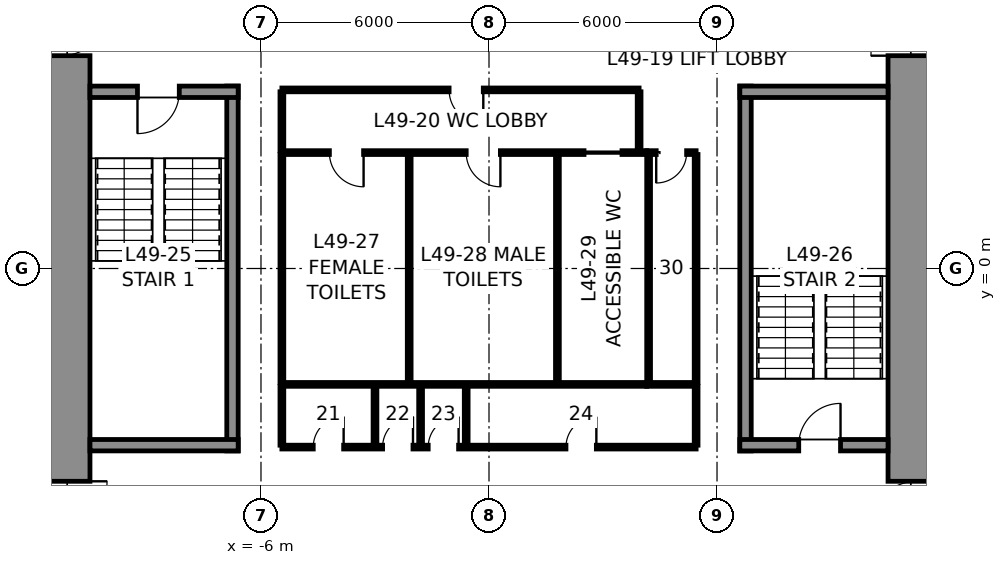
"""IFC4 building model, lengths in metres.
Left out: names, types, materials, properties, quantities, classifications, styles, units other than length and angle.
Written with IfcOpenShell. Run it as: python <this file> out.ifc"""

import sys

from ifc_helpers import new_model, si_unit, direction, frame, frame_2d, origin, place, context, subcontext, project, spatial, rectangle, extrude, element, fill, save


model = new_model("IFC4")
c1 = context("Model", 3, precision=1e-05, world=origin(), true_north=direction((0.0, 1.0)))
c2 = subcontext(c1, "Body", "Model", "MODEL_VIEW")
j1 = project(units=[si_unit("LENGTHUNIT", "METRE"), si_unit("PLANEANGLEUNIT", "RADIAN")], contexts=[c1])
p1 = place(None, origin())
s1 = spatial("IfcSite", under=j1, at=p1, CompositionType="ELEMENT")
p2 = place(p1, origin())
s2 = spatial("IfcBuilding", under=s1, at=p2, CompositionType="ELEMENT")
p3 = place(p2, frame((0.0, 0.0, 225.8)))
s3 = spatial("IfcBuildingStorey", under=s2, at=p3, CompositionType="ELEMENT", Elevation=225.8)
p4 = place(p3, frame((11.25, 10.5, 0.0), z_axis=(0.0, 0.0, 1.0), x_axis=(0.0, -1.0, 0.0)))
e1 = element("IfcWall", 1, at=p4, inside=s3, PredefinedType="SHEAR", context=c2, shape_type="SweptSolid", body=[
    extrude(rectangle(XDim=21.0, YDim=1.5, at=frame_2d((10.5, 0.0))), origin(), (0.0, 0.0, 1.0), 4.0),
])
p5 = place(p4, frame((3.7, 0.0, 0.0)))
e2 = element("IfcOpeningElement", 2, at=p5, cuts=e1, PredefinedType="OPENING", context=c2, shape_type="SweptSolid", body=[
    extrude(rectangle(XDim=1.2, YDim=2.3, at=frame_2d((0.6, 1.15))), frame((0.0, 0.76, 0.0), z_axis=(0.0, -1.0, 0.0), x_axis=(1.0, 0.0, 0.0)), (0.0, 0.0, 1.0), 1.52),
])
p6 = place(p4, frame((16.1, 0.0, 0.0)))
e3 = element("IfcOpeningElement", 3, at=p6, cuts=e1, PredefinedType="OPENING", context=c2, shape_type="SweptSolid", body=[
    extrude(rectangle(XDim=1.2, YDim=2.3, at=frame_2d((0.6, 1.15))), frame((0.0, 0.76, 0.0), z_axis=(0.0, -1.0, 0.0), x_axis=(1.0, 0.0, 0.0)), (0.0, 0.0, 1.0), 1.52),
])
p7 = place(p3, frame((-11.25, -10.5, 0.0), z_axis=(0.0, 0.0, 1.0), x_axis=(0.0, 1.0, 0.0)))
e4 = element("IfcWall", 4, at=p7, inside=s3, PredefinedType="SHEAR", context=c2, shape_type="SweptSolid", body=[
    extrude(rectangle(XDim=21.0, YDim=1.5, at=frame_2d((10.5, 0.0))), origin(), (0.0, 0.0, 1.0), 4.0),
])
p8 = place(p7, frame((16.1, 0.0, 0.0)))
e5 = element("IfcOpeningElement", 5, at=p8, cuts=e4, PredefinedType="OPENING", context=c2, shape_type="SweptSolid", body=[
    extrude(rectangle(XDim=1.2, YDim=2.3, at=frame_2d((0.6, 1.15))), frame((0.0, 0.76, 0.0), z_axis=(0.0, -1.0, 0.0), x_axis=(1.0, 0.0, 0.0)), (0.0, 0.0, 1.0), 1.52),
])
p9 = place(p7, frame((3.7, 0.0, 0.0)))
e6 = element("IfcOpeningElement", 6, at=p9, cuts=e4, PredefinedType="OPENING", context=c2, shape_type="SweptSolid", body=[
    extrude(rectangle(XDim=1.2, YDim=2.3, at=frame_2d((0.6, 1.15))), frame((0.0, 0.76, 0.0), z_axis=(0.0, -1.0, 0.0), x_axis=(1.0, 0.0, 0.0)), (0.0, 0.0, 1.0), 1.52),
])
p10 = place(p3, frame((-6.75, -4.8, 0.0), z_axis=(0.0, 0.0, 1.0), x_axis=(0.0, 1.0, 0.0)))
e7 = element("IfcWall", 7, at=p10, inside=s3, PredefinedType="SOLIDWALL", context=c2, shape_type="SweptSolid", body=[
    extrude(rectangle(XDim=9.6, YDim=0.3, at=frame_2d((4.8, 0.0))), origin(), (0.0, 0.0, 1.0), 3.75),
])
p11 = place(p3, frame((-10.5, 4.65, 0.0), z_axis=(0.0, 0.0, 1.0), x_axis=(1.0, 0.0, 0.0)))
e8 = element("IfcWall", 8, at=p11, inside=s3, PredefinedType="SOLIDWALL", context=c2, shape_type="SweptSolid", body=[
    extrude(rectangle(XDim=3.9, YDim=0.3, at=frame_2d((1.95, 0.0))), origin(), (0.0, 0.0, 1.0), 3.75),
])
p12 = place(p11, frame((1.25, 0.0, 0.0)))
e9 = element("IfcOpeningElement", 9, at=p12, cuts=e8, PredefinedType="OPENING", context=c2, shape_type="SweptSolid", body=[
    extrude(rectangle(XDim=1.1, YDim=2.3, at=frame_2d((0.55, 1.15))), frame((0.0, 0.16, 0.0), z_axis=(0.0, -1.0, 0.0), x_axis=(1.0, 0.0, 0.0)), (0.0, 0.0, 1.0), 0.32),
])
p13 = place(p3, frame((-6.6, -4.65, 0.0), z_axis=(0.0, 0.0, 1.0), x_axis=(-1.0, 0.0, 0.0)))
e10 = element("IfcWall", 10, at=p13, inside=s3, PredefinedType="SOLIDWALL", context=c2, shape_type="SweptSolid", body=[
    extrude(rectangle(XDim=3.9, YDim=0.3, at=frame_2d((1.95, 0.0))), origin(), (0.0, 0.0, 1.0), 3.75),
])
p14 = place(p3, frame((6.75, -4.8, 0.0), z_axis=(0.0, 0.0, 1.0), x_axis=(0.0, 1.0, 0.0)))
e11 = element("IfcWall", 11, at=p14, inside=s3, PredefinedType="SOLIDWALL", context=c2, shape_type="SweptSolid", body=[
    extrude(rectangle(XDim=9.6, YDim=0.3, at=frame_2d((4.8, 0.0))), origin(), (0.0, 0.0, 1.0), 3.75),
])
p15 = place(p3, frame((6.6, 4.65, 0.0), z_axis=(0.0, 0.0, 1.0), x_axis=(1.0, 0.0, 0.0)))
e12 = element("IfcWall", 12, at=p15, inside=s3, PredefinedType="SOLIDWALL", context=c2, shape_type="SweptSolid", body=[
    extrude(rectangle(XDim=3.9, YDim=0.3, at=frame_2d((1.95, 0.0))), origin(), (0.0, 0.0, 1.0), 3.75),
])
p16 = place(p3, frame((10.5, -4.65, 0.0), z_axis=(0.0, 0.0, 1.0), x_axis=(-1.0, 0.0, 0.0)))
e13 = element("IfcWall", 13, at=p16, inside=s3, PredefinedType="SOLIDWALL", context=c2, shape_type="SweptSolid", body=[
    extrude(rectangle(XDim=3.9, YDim=0.3, at=frame_2d((1.95, 0.0))), origin(), (0.0, 0.0, 1.0), 3.75),
])
p17 = place(p16, frame((1.25, 0.0, 0.0)))
e14 = element("IfcOpeningElement", 14, at=p17, cuts=e13, PredefinedType="OPENING", context=c2, shape_type="SweptSolid", body=[
    extrude(rectangle(XDim=1.1, YDim=2.3, at=frame_2d((0.55, 1.15))), frame((0.0, 0.16, 0.0), z_axis=(0.0, -1.0, 0.0), x_axis=(1.0, 0.0, 0.0)), (0.0, 0.0, 1.0), 0.32),
])
p18 = place(p3, frame((-5.45, 3.05, 0.0), z_axis=(0.0, 0.0, 1.0), x_axis=(1.0, 0.0, 0.0)))
e15 = element("IfcWall", 15, at=p18, inside=s3, PredefinedType="PARTITIONING", context=c2, shape_type="SweptSolid", body=[
    extrude(rectangle(XDim=9.6, YDim=0.1, at=frame_2d((4.8, 0.0))), origin(), (0.0, 0.0, 1.0), 3.75),
])
p19 = place(p18, frame((1.25, 0.0, 0.0)))
e16 = element("IfcOpeningElement", 16, at=p19, cuts=e15, PredefinedType="OPENING", context=c2, shape_type="SweptSolid", body=[
    extrude(rectangle(XDim=0.9, YDim=2.3, at=frame_2d((0.45, 1.15))), frame((0.0, 0.06, 0.0), z_axis=(0.0, -1.0, 0.0), x_axis=(1.0, 0.0, 0.0)), (0.0, 0.0, 1.0), 0.12),
])
p20 = place(p18, frame((4.85, 0.0, 0.0)))
e17 = element("IfcOpeningElement", 17, at=p20, cuts=e15, PredefinedType="OPENING", context=c2, shape_type="SweptSolid", body=[
    extrude(rectangle(XDim=0.9, YDim=2.3, at=frame_2d((0.45, 1.15))), frame((0.0, 0.06, 0.0), z_axis=(0.0, -1.0, 0.0), x_axis=(1.0, 0.0, 0.0)), (0.0, 0.0, 1.0), 0.12),
])
p21 = place(p18, frame((7.95, 0.0, 0.0)))
e18 = element("IfcOpeningElement", 18, at=p21, cuts=e15, PredefinedType="OPENING", context=c2, shape_type="SweptSolid", body=[
    extrude(rectangle(XDim=1.0, YDim=2.3, at=frame_2d((0.5, 1.15))), frame((0.0, 0.06, 0.0), z_axis=(0.0, -1.0, 0.0), x_axis=(1.0, 0.0, 0.0)), (0.0, 0.0, 1.0), 0.12),
])
p22 = place(p3, frame((4.15, 3.05, 0.0), z_axis=(0.0, 0.0, 1.0), x_axis=(1.0, 0.0, 0.0)))
e19 = element("IfcWall", 19, at=p22, inside=s3, PredefinedType="PARTITIONING", context=c2, shape_type="SweptSolid", body=[
    extrude(rectangle(XDim=1.3, YDim=0.1, at=frame_2d((0.65, 0.0))), origin(), (0.0, 0.0, 1.0), 3.75),
])
p23 = place(p22, frame((0.25, 0.0, 0.0)))
e20 = element("IfcOpeningElement", 20, at=p23, cuts=e19, PredefinedType="OPENING", context=c2, shape_type="SweptSolid", body=[
    extrude(rectangle(XDim=0.8, YDim=2.3, at=frame_2d((0.4, 1.15))), frame((0.0, 0.06, 0.0), z_axis=(0.0, -1.0, 0.0), x_axis=(1.0, 0.0, 0.0)), (0.0, 0.0, 1.0), 0.12),
])
p24 = place(p3, frame((4.15, -3.05, 0.0), z_axis=(0.0, 0.0, 1.0), x_axis=(-1.0, 0.0, 0.0)))
e21 = element("IfcWall", 21, at=p24, inside=s3, PredefinedType="PARTITIONING", context=c2, shape_type="SweptSolid", body=[
    extrude(rectangle(XDim=9.6, YDim=0.1, at=frame_2d((4.8, 0.0))), origin(), (0.0, 0.0, 1.0), 3.75),
])
p25 = place(p3, frame((5.45, -3.05, 0.0), z_axis=(0.0, 0.0, 1.0), x_axis=(-1.0, 0.0, 0.0)))
e22 = element("IfcWall", 22, at=p25, inside=s3, PredefinedType="PARTITIONING", context=c2, shape_type="SweptSolid", body=[
    extrude(rectangle(XDim=1.3, YDim=0.1, at=frame_2d((0.65, 0.0))), origin(), (0.0, 0.0, 1.0), 3.75),
])
for number, where, z_axis, x_axis in (
    (23, (5.45, 3.0, 0.0), (0.0, 0.0, 1.0), (0.0, -1.0, 0.0)),
    (24, (-5.45, -3.0, 0.0), (0.0, 0.0, 1.0), (0.0, 1.0, 0.0)),
    (25, (-2.1, -3.0, 0.0), (0.0, 0.0, 1.0), (0.0, 1.0, 0.0)),
    (26, (1.8, -3.0, 0.0), (0.0, 0.0, 1.0), (0.0, 1.0, 0.0)),
    (27, (4.2, -3.0, 0.0), (0.0, 0.0, 1.0), (0.0, 1.0, 0.0)),
):
    element("IfcWall", number, at=place(p3, frame(where, z_axis=z_axis, x_axis=x_axis)), inside=s3, PredefinedType="PARTITIONING", context=c2, shape_type="SweptSolid", body=[
        extrude(rectangle(XDim=6.0, YDim=0.1, at=frame_2d((3.0, 0.0))), origin(), (0.0, 0.0, 1.0), 3.75),
    ])
p26 = place(p3, frame((-5.45, 4.7, 0.0), z_axis=(0.0, 0.0, 1.0), x_axis=(1.0, 0.0, 0.0)))
e28 = element("IfcWall", 28, at=p26, inside=s3, PredefinedType="PARTITIONING", context=c2, shape_type="SweptSolid", body=[
    extrude(rectangle(XDim=9.4, YDim=0.1, at=frame_2d((4.7, 0.0))), origin(), (0.0, 0.0, 1.0), 3.75),
])
p27 = place(p26, frame((4.4, 0.0, 0.0)))
e29 = element("IfcOpeningElement", 29, at=p27, cuts=e28, PredefinedType="OPENING", context=c2, shape_type="SweptSolid", body=[
    extrude(rectangle(XDim=0.9, YDim=2.3, at=frame_2d((0.45, 1.15))), frame((0.0, 0.06, 0.0), z_axis=(0.0, -1.0, 0.0), x_axis=(1.0, 0.0, 0.0)), (0.0, 0.0, 1.0), 0.12),
])
for number, where, z_axis, x_axis in (
    (30, (-5.45, 3.1, 0.0), (0.0, 0.0, 1.0), (0.0, 1.0, 0.0)),
    (31, (3.95, 3.1, 0.0), (0.0, 0.0, 1.0), (0.0, 1.0, 0.0)),
):
    element("IfcWall", number, at=place(p3, frame(where, z_axis=z_axis, x_axis=x_axis)), inside=s3, PredefinedType="PARTITIONING", context=c2, shape_type="SweptSolid", body=[
        extrude(rectangle(XDim=1.55, YDim=0.1, at=frame_2d((0.775, 0.0))), origin(), (0.0, 0.0, 1.0), 3.75),
    ])
p28 = place(p3, frame((5.45, -4.7, 0.0), z_axis=(0.0, 0.0, 1.0), x_axis=(-1.0, 0.0, 0.0)))
e32 = element("IfcWall", 32, at=p28, inside=s3, PredefinedType="PARTITIONING", context=c2, shape_type="SweptSolid", body=[
    extrude(rectangle(XDim=10.9, YDim=0.1, at=frame_2d((5.45, 0.0))), origin(), (0.0, 0.0, 1.0), 3.75),
])
p29 = place(p28, frame((9.275, 0.0, 0.0)))
e33 = element("IfcOpeningElement", 33, at=p29, cuts=e32, PredefinedType="OPENING", context=c2, shape_type="SweptSolid", body=[
    extrude(rectangle(XDim=0.8, YDim=2.3, at=frame_2d((0.4, 1.15))), frame((0.0, 0.06, 0.0), z_axis=(0.0, -1.0, 0.0), x_axis=(1.0, 0.0, 0.0)), (0.0, 0.0, 1.0), 0.12),
])
p30 = place(p28, frame((7.45, 0.0, 0.0)))
e34 = element("IfcOpeningElement", 34, at=p30, cuts=e32, PredefinedType="OPENING", context=c2, shape_type="SweptSolid", body=[
    extrude(rectangle(XDim=0.8, YDim=2.3, at=frame_2d((0.4, 1.15))), frame((0.0, 0.06, 0.0), z_axis=(0.0, -1.0, 0.0), x_axis=(1.0, 0.0, 0.0)), (0.0, 0.0, 1.0), 0.12),
])
p31 = place(p28, frame((6.25, 0.0, 0.0)))
e35 = element("IfcOpeningElement", 35, at=p31, cuts=e32, PredefinedType="OPENING", context=c2, shape_type="SweptSolid", body=[
    extrude(rectangle(XDim=0.8, YDim=2.3, at=frame_2d((0.4, 1.15))), frame((0.0, 0.06, 0.0), z_axis=(0.0, -1.0, 0.0), x_axis=(1.0, 0.0, 0.0)), (0.0, 0.0, 1.0), 0.12),
])
p32 = place(p28, frame((2.625, 0.0, 0.0)))
e36 = element("IfcOpeningElement", 36, at=p32, cuts=e32, PredefinedType="OPENING", context=c2, shape_type="SweptSolid", body=[
    extrude(rectangle(XDim=0.8, YDim=2.3, at=frame_2d((0.4, 1.15))), frame((0.0, 0.06, 0.0), z_axis=(0.0, -1.0, 0.0), x_axis=(1.0, 0.0, 0.0)), (0.0, 0.0, 1.0), 0.12),
])
for number, where, z_axis, x_axis in (
    (37, (-5.45, -3.1, 0.0), (0.0, 0.0, 1.0), (0.0, -1.0, 0.0)),
    (38, (5.45, -3.1, 0.0), (0.0, 0.0, 1.0), (0.0, -1.0, 0.0)),
    (39, (-3.0, -3.1, 0.0), (0.0, 0.0, 1.0), (0.0, -1.0, 0.0)),
    (40, (-1.8, -3.1, 0.0), (0.0, 0.0, 1.0), (0.0, -1.0, 0.0)),
    (41, (-0.6, -3.1, 0.0), (0.0, 0.0, 1.0), (0.0, -1.0, 0.0)),
):
    element("IfcWall", number, at=place(p3, frame(where, z_axis=z_axis, x_axis=x_axis)), inside=s3, PredefinedType="PARTITIONING", context=c2, shape_type="SweptSolid", body=[
        extrude(rectangle(XDim=1.55, YDim=0.1, at=frame_2d((0.775, 0.0))), origin(), (0.0, 0.0, 1.0), 3.75),
    ])
p33 = place(p12, frame((1.1, 0.0, 0.0), z_axis=(0.0, 0.0, 1.0), x_axis=(-1.0, 0.0, 0.0)))
e42 = element("IfcDoor", 42, at=p33, inside=s3, OperationType="SINGLE_SWING_RIGHT", PredefinedType="DOOR", context=c2, shape_type="SweptSolid", body=[
    extrude(rectangle(XDim=1.1, YDim=2.3, at=frame_2d((0.55, 1.15))), frame((0.0, 0.025, 0.0), z_axis=(0.0, -1.0, 0.0), x_axis=(1.0, 0.0, 0.0)), (0.0, 0.0, 1.0), 0.05),
])
fill(e9, e42)
p34 = place(p17, frame((1.1, 0.0, 0.0), z_axis=(0.0, 0.0, 1.0), x_axis=(-1.0, 0.0, 0.0)))
e43 = element("IfcDoor", 43, at=p34, inside=s3, OperationType="SINGLE_SWING_RIGHT", PredefinedType="DOOR", context=c2, shape_type="SweptSolid", body=[
    extrude(rectangle(XDim=1.1, YDim=2.3, at=frame_2d((0.55, 1.15))), frame((0.0, 0.025, 0.0), z_axis=(0.0, -1.0, 0.0), x_axis=(1.0, 0.0, 0.0)), (0.0, 0.0, 1.0), 0.05),
])
fill(e14, e43)
p35 = place(p19, frame((0.9, 0.0, 0.0), z_axis=(0.0, 0.0, 1.0), x_axis=(-1.0, 0.0, 0.0)))
e44 = element("IfcDoor", 44, at=p35, inside=s3, OperationType="SINGLE_SWING_LEFT", PredefinedType="DOOR", context=c2, shape_type="SweptSolid", body=[
    extrude(rectangle(XDim=0.9, YDim=2.3, at=frame_2d((0.45, 1.15))), frame((0.0, 0.025, 0.0), z_axis=(0.0, -1.0, 0.0), x_axis=(1.0, 0.0, 0.0)), (0.0, 0.0, 1.0), 0.05),
])
fill(e16, e44)
p36 = place(p20, frame((0.9, 0.0, 0.0), z_axis=(0.0, 0.0, 1.0), x_axis=(-1.0, 0.0, 0.0)))
e45 = element("IfcDoor", 45, at=p36, inside=s3, OperationType="SINGLE_SWING_LEFT", PredefinedType="DOOR", context=c2, shape_type="SweptSolid", body=[
    extrude(rectangle(XDim=0.9, YDim=2.3, at=frame_2d((0.45, 1.15))), frame((0.0, 0.025, 0.0), z_axis=(0.0, -1.0, 0.0), x_axis=(1.0, 0.0, 0.0)), (0.0, 0.0, 1.0), 0.05),
])
fill(e17, e45)
p37 = place(p21, frame((1.0, 0.0, 0.0), z_axis=(0.0, 0.0, 1.0), x_axis=(-1.0, 0.0, 0.0)))
e46 = element("IfcDoor", 46, at=p37, inside=s3, OperationType="SLIDING_TO_LEFT", PredefinedType="DOOR", context=c2, shape_type="SweptSolid", body=[
    extrude(rectangle(XDim=1.0, YDim=2.3, at=frame_2d((0.5, 1.15))), frame((0.0, 0.025, 0.0), z_axis=(0.0, -1.0, 0.0), x_axis=(1.0, 0.0, 0.0)), (0.0, 0.0, 1.0), 0.05),
])
fill(e18, e46)
p38 = place(p23, frame((0.8, 0.0, 0.0), z_axis=(0.0, 0.0, 1.0), x_axis=(-1.0, 0.0, 0.0)))
e47 = element("IfcDoor", 47, at=p38, inside=s3, OperationType="SINGLE_SWING_RIGHT", PredefinedType="DOOR", context=c2, shape_type="SweptSolid", body=[
    extrude(rectangle(XDim=0.8, YDim=2.3, at=frame_2d((0.4, 1.15))), frame((0.0, 0.025, 0.0), z_axis=(0.0, -1.0, 0.0), x_axis=(1.0, 0.0, 0.0)), (0.0, 0.0, 1.0), 0.05),
])
fill(e20, e47)
p39 = place(p27, frame((0.9, 0.0, 0.0), z_axis=(0.0, 0.0, 1.0), x_axis=(-1.0, 0.0, 0.0)))
e48 = element("IfcDoor", 48, at=p39, inside=s3, OperationType="SINGLE_SWING_LEFT", PredefinedType="DOOR", context=c2, shape_type="SweptSolid", body=[
    extrude(rectangle(XDim=0.9, YDim=2.3, at=frame_2d((0.45, 1.15))), frame((0.0, 0.025, 0.0), z_axis=(0.0, -1.0, 0.0), x_axis=(1.0, 0.0, 0.0)), (0.0, 0.0, 1.0), 0.05),
])
fill(e29, e48)
p40 = place(p29, frame((0.8, 0.0, 0.0), z_axis=(0.0, 0.0, 1.0), x_axis=(-1.0, 0.0, 0.0)))
e49 = element("IfcDoor", 49, at=p40, inside=s3, OperationType="SINGLE_SWING_RIGHT", PredefinedType="DOOR", context=c2, shape_type="SweptSolid", body=[
    extrude(rectangle(XDim=0.8, YDim=2.3, at=frame_2d((0.4, 1.15))), frame((0.0, 0.025, 0.0), z_axis=(0.0, -1.0, 0.0), x_axis=(1.0, 0.0, 0.0)), (0.0, 0.0, 1.0), 0.05),
])
fill(e33, e49)
p41 = place(p30, frame((0.8, 0.0, 0.0), z_axis=(0.0, 0.0, 1.0), x_axis=(-1.0, 0.0, 0.0)))
e50 = element("IfcDoor", 50, at=p41, inside=s3, OperationType="SINGLE_SWING_RIGHT", PredefinedType="DOOR", context=c2, shape_type="SweptSolid", body=[
    extrude(rectangle(XDim=0.8, YDim=2.3, at=frame_2d((0.4, 1.15))), frame((0.0, 0.025, 0.0), z_axis=(0.0, -1.0, 0.0), x_axis=(1.0, 0.0, 0.0)), (0.0, 0.0, 1.0), 0.05),
])
fill(e34, e50)
p42 = place(p31, frame((0.8, 0.0, 0.0), z_axis=(0.0, 0.0, 1.0), x_axis=(-1.0, 0.0, 0.0)))
e51 = element("IfcDoor", 51, at=p42, inside=s3, OperationType="SINGLE_SWING_RIGHT", PredefinedType="DOOR", context=c2, shape_type="SweptSolid", body=[
    extrude(rectangle(XDim=0.8, YDim=2.3, at=frame_2d((0.4, 1.15))), frame((0.0, 0.025, 0.0), z_axis=(0.0, -1.0, 0.0), x_axis=(1.0, 0.0, 0.0)), (0.0, 0.0, 1.0), 0.05),
])
fill(e35, e51)
p43 = place(p32, frame((0.8, 0.0, 0.0), z_axis=(0.0, 0.0, 1.0), x_axis=(-1.0, 0.0, 0.0)))
e52 = element("IfcDoor", 52, at=p43, inside=s3, OperationType="SINGLE_SWING_RIGHT", PredefinedType="DOOR", context=c2, shape_type="SweptSolid", body=[
    extrude(rectangle(XDim=0.8, YDim=2.3, at=frame_2d((0.4, 1.15))), frame((0.0, 0.025, 0.0), z_axis=(0.0, -1.0, 0.0), x_axis=(1.0, 0.0, 0.0)), (0.0, 0.0, 1.0), 0.05),
])
fill(e36, e52)
p44 = place(p8, frame((1.2, 0.0, 0.0), z_axis=(0.0, 0.0, 1.0), x_axis=(-1.0, 0.0, 0.0)))
e53 = element("IfcDoor", 53, at=p44, inside=s3, OperationType="SINGLE_SWING_LEFT", PredefinedType="DOOR", context=c2, shape_type="SweptSolid", body=[
    extrude(rectangle(XDim=1.2, YDim=2.3, at=frame_2d((0.6, 1.15))), frame((0.0, 0.025, 0.0), z_axis=(0.0, -1.0, 0.0), x_axis=(1.0, 0.0, 0.0)), (0.0, 0.0, 1.0), 0.05),
])
fill(e5, e53)
p45 = place(p9, frame((1.2, 0.0, 0.0), z_axis=(0.0, 0.0, 1.0), x_axis=(-1.0, 0.0, 0.0)))
e54 = element("IfcDoor", 54, at=p45, inside=s3, OperationType="SINGLE_SWING_LEFT", PredefinedType="DOOR", context=c2, shape_type="SweptSolid", body=[
    extrude(rectangle(XDim=1.2, YDim=2.3, at=frame_2d((0.6, 1.15))), frame((0.0, 0.025, 0.0), z_axis=(0.0, -1.0, 0.0), x_axis=(1.0, 0.0, 0.0)), (0.0, 0.0, 1.0), 0.05),
])
fill(e6, e54)
p46 = place(p5, frame((1.2, 0.0, 0.0), z_axis=(0.0, 0.0, 1.0), x_axis=(-1.0, 0.0, 0.0)))
e55 = element("IfcDoor", 55, at=p46, inside=s3, OperationType="SINGLE_SWING_LEFT", PredefinedType="DOOR", context=c2, shape_type="SweptSolid", body=[
    extrude(rectangle(XDim=1.2, YDim=2.3, at=frame_2d((0.6, 1.15))), frame((0.0, 0.025, 0.0), z_axis=(0.0, -1.0, 0.0), x_axis=(1.0, 0.0, 0.0)), (0.0, 0.0, 1.0), 0.05),
])
fill(e2, e55)
p47 = place(p6, frame((1.2, 0.0, 0.0), z_axis=(0.0, 0.0, 1.0), x_axis=(-1.0, 0.0, 0.0)))
e56 = element("IfcDoor", 56, at=p47, inside=s3, OperationType="SINGLE_SWING_LEFT", PredefinedType="DOOR", context=c2, shape_type="SweptSolid", body=[
    extrude(rectangle(XDim=1.2, YDim=2.3, at=frame_2d((0.6, 1.15))), frame((0.0, 0.025, 0.0), z_axis=(0.0, -1.0, 0.0), x_axis=(1.0, 0.0, 0.0)), (0.0, 0.0, 1.0), 0.05),
])
fill(e3, e56)
save(model, sys.argv[1])
